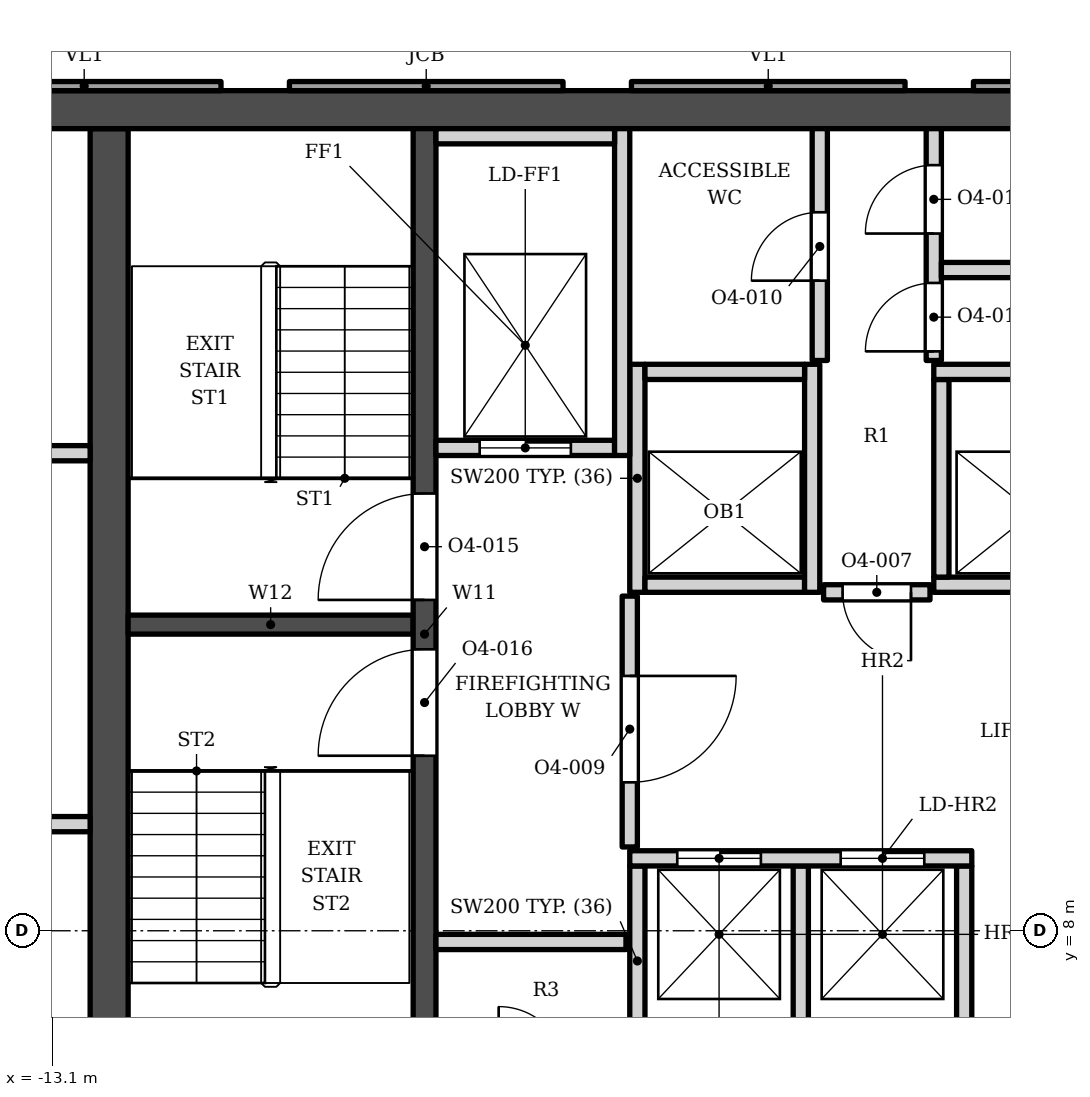
"""IFC4 building model, lengths in metres.
Left out: names, types, materials, properties, quantities, classifications, styles, units other than length and angle.
Written with IfcOpenShell. Run it as: python <this file> out.ifc"""

import sys

from ifc_helpers import new_model, si_unit, direction, frame, frame_2d, origin, place, context, subcontext, project, spatial, polyline, rectangle, outline, extrude, element, fill, save


model = new_model("IFC4")
c1 = context("Model", 3, precision=1e-05, world=origin(), true_north=direction((0.0, 1.0)))
c2 = subcontext(c1, "Body", "Model", "MODEL_VIEW")
j1 = project(units=[si_unit("LENGTHUNIT", "METRE"), si_unit("PLANEANGLEUNIT", "RADIAN")], contexts=[c1])
p1 = place(None, origin())
s1 = spatial("IfcSite", under=j1, at=p1, CompositionType="ELEMENT")
p2 = place(p1, origin())
s2 = spatial("IfcBuilding", under=s1, at=p2, CompositionType="ELEMENT")
p3 = place(p2, frame((0.0, 0.0, 179.7)))
s3 = spatial("IfcBuildingStorey", under=s2, at=p3, CompositionType="ELEMENT", Elevation=179.7)
p4 = place(p3, frame((-15.1, 18.802, 0.0), z_axis=(0.0, 0.0, 1.0), x_axis=(1.0, 0.0, 0.0)))
e1 = element("IfcWall", 1, at=p4, inside=s3, PredefinedType="SHEAR", context=c2, shape_type="SweptSolid", body=[
    extrude(rectangle(XDim=30.2, YDim=0.5, at=frame_2d((15.1, 0.0))), origin(), (0.0, 0.0, 1.0), 3.9),
])
p5 = place(p3, frame((-12.35, 5.253, 0.0), z_axis=(0.0, 0.0, 1.0), x_axis=(0.0, 1.0, 0.0)))
e2 = element("IfcWall", 2, at=p5, inside=s3, PredefinedType="SHEAR", context=c2, shape_type="SweptSolid", body=[
    extrude(rectangle(XDim=13.3, YDim=0.5, at=frame_2d((6.65, 0.0))), origin(), (0.0, 0.0, 1.0), 3.9),
])
p6 = place(p3, frame((-8.2, 5.253, 0.0), z_axis=(0.0, 0.0, 1.0), x_axis=(0.0, 1.0, 0.0)))
e3 = element("IfcWall", 3, at=p6, inside=s3, PredefinedType="SHEAR", context=c2, shape_type="SweptSolid", body=[
    extrude(rectangle(XDim=13.3, YDim=0.3, at=frame_2d((6.65, 0.0))), origin(), (0.0, 0.0, 1.0), 3.9),
])
p7 = place(p6, frame((7.1, 0.0, 0.0)))
e4 = element("IfcOpeningElement", 4, at=p7, cuts=e3, PredefinedType="OPENING", context=c2, shape_type="SweptSolid", body=[
    extrude(rectangle(XDim=1.4, YDim=2.1, at=frame_2d((0.7, 1.05))), frame((0.0, 0.16, 0.0), z_axis=(0.0, -1.0, 0.0), x_axis=(1.0, 0.0, 0.0)), (0.0, 0.0, 1.0), 0.32),
])
p8 = place(p6, frame((5.05, 0.0, 0.0)))
e5 = element("IfcOpeningElement", 5, at=p8, cuts=e3, PredefinedType="OPENING", context=c2, shape_type="SweptSolid", body=[
    extrude(rectangle(XDim=1.4, YDim=2.1, at=frame_2d((0.7, 1.05))), frame((0.0, 0.16, 0.0), z_axis=(0.0, -1.0, 0.0), x_axis=(1.0, 0.0, 0.0)), (0.0, 0.0, 1.0), 0.32),
])
p9 = place(p3, frame((-12.1, 12.028, 0.0), z_axis=(0.0, 0.0, 1.0), x_axis=(1.0, 0.0, 0.0)))
e6 = element("IfcWall", 6, at=p9, inside=s3, PredefinedType="SHEAR", context=c2, shape_type="SweptSolid", body=[
    extrude(rectangle(XDim=3.75, YDim=0.25, at=frame_2d((1.875, 0.0))), origin(), (0.0, 0.0, 1.0), 3.9),
])
p10 = place(p3, origin())
e7 = element("IfcWall", 7, at=p10, inside=s3, PredefinedType="SOLIDWALL", context=c2, shape_type="SweptSolid", body=[
    extrude(outline(polyline([(-0.978, 19.173), (-0.978, 19.052), (2.622, 19.052), (2.622, 19.173), (-0.978, 19.173)])), origin(), (0.0, 0.0, 1.0), 3.0),
])
p11 = place(p3, origin())
e8 = element("IfcWall", 8, at=p11, inside=s3, PredefinedType="ELEMENTEDWALL", context=c2, shape_type="SweptSolid", body=[
    extrude(outline(polyline([(-5.478, 19.173), (-5.478, 19.052), (-1.878, 19.052), (-1.878, 19.173), (-5.478, 19.173)])), origin(), (0.0, 0.0, 1.0), 3.0),
])
p12 = place(p3, origin())
e9 = element("IfcWall", 9, at=p12, inside=s3, PredefinedType="SOLIDWALL", context=c2, shape_type="SweptSolid", body=[
    extrude(outline(polyline([(-9.978, 19.173), (-9.978, 19.052), (-6.378, 19.052), (-6.378, 19.173), (-9.978, 19.173)])), origin(), (0.0, 0.0, 1.0), 3.0),
])
p13 = place(p3, origin())
e10 = element("IfcWall", 10, at=p13, inside=s3, PredefinedType="ELEMENTEDWALL", context=c2, shape_type="SweptSolid", body=[
    extrude(outline(polyline([(-14.478, 19.173), (-14.478, 19.052), (-10.878, 19.052), (-10.878, 19.173), (-14.478, 19.173)])), origin(), (0.0, 0.0, 1.0), 3.0),
])
for number, where, z_axis, x_axis in (
    (11, (-5.4, 6.353, 0.0), (0.0, 0.0, 1.0), (0.0, 1.0, 0.0)),
    (12, (-3.25, 6.353, 0.0), (0.0, 0.0, 1.0), (0.0, 1.0, 0.0)),
    (13, (-1.1, 6.353, 0.0), (0.0, 0.0, 1.0), (0.0, 1.0, 0.0)),
    (14, (-8.05, 7.853, 0.0), (0.0, 0.0, 1.0), (1.0, 0.0, 0.0)),
):
    element("IfcWall", number, at=place(p3, frame(where, z_axis=z_axis, x_axis=x_axis)), inside=s3, PredefinedType="SOLIDWALL", context=c2, shape_type="SweptSolid", body=[
        extrude(rectangle(XDim=2.5, YDim=0.2, at=frame_2d((1.25, 0.0))), origin(), (0.0, 0.0, 1.0), 3.73),
    ])
p14 = place(p3, frame((-5.5, 8.953, 0.0), z_axis=(0.0, 0.0, 1.0), x_axis=(1.0, 0.0, 0.0)))
e15 = element("IfcWall", 15, at=p14, inside=s3, PredefinedType="SOLIDWALL", context=c2, shape_type="SweptSolid", body=[
    extrude(rectangle(XDim=4.5, YDim=0.2, at=frame_2d((2.25, 0.0))), origin(), (0.0, 0.0, 1.0), 3.73),
])
p15 = place(p14, frame((0.625, 0.0, 0.0)))
e16 = element("IfcOpeningElement", 16, at=p15, cuts=e15, PredefinedType="OPENING", context=c2, shape_type="SweptSolid", body=[
    extrude(rectangle(XDim=1.1, YDim=2.1, at=frame_2d((0.55, 1.05))), frame((0.0, 0.11, 0.0), z_axis=(0.0, -1.0, 0.0), x_axis=(1.0, 0.0, 0.0)), (0.0, 0.0, 1.0), 0.22),
])
p16 = place(p14, frame((2.775, 0.0, 0.0)))
e17 = element("IfcOpeningElement", 17, at=p16, cuts=e15, PredefinedType="OPENING", context=c2, shape_type="SweptSolid", body=[
    extrude(rectangle(XDim=1.1, YDim=2.1, at=frame_2d((0.55, 1.05))), frame((0.0, 0.11, 0.0), z_axis=(0.0, -1.0, 0.0), x_axis=(1.0, 0.0, 0.0)), (0.0, 0.0, 1.0), 0.22),
])
p17 = place(p3, frame((-5.5, 9.103, 0.0), z_axis=(0.0, 0.0, 1.0), x_axis=(0.0, 1.0, 0.0)))
e18 = element("IfcWall", 18, at=p17, inside=s3, PredefinedType="SOLIDWALL", context=c2, shape_type="SweptSolid", body=[
    extrude(rectangle(XDim=3.3, YDim=0.2, at=frame_2d((1.65, 0.0))), origin(), (0.0, 0.0, 1.0), 3.73),
])
p18 = place(p17, frame((0.85, 0.0, 0.0)))
e19 = element("IfcOpeningElement", 19, at=p18, cuts=e18, PredefinedType="OPENING", context=c2, shape_type="SweptSolid", body=[
    extrude(rectangle(XDim=1.4, YDim=2.1, at=frame_2d((0.7, 1.05))), frame((0.0, 0.11, 0.0), z_axis=(0.0, -1.0, 0.0), x_axis=(1.0, 0.0, 0.0)), (0.0, 0.0, 1.0), 0.22),
])
p19 = place(p3, frame((-15.1, 9.403, 0.0), z_axis=(0.0, 0.0, 1.0), x_axis=(1.0, 0.0, 0.0)))
e20 = element("IfcWall", 20, at=p19, inside=s3, PredefinedType="PARTITIONING", context=c2, shape_type="SweptSolid", body=[
    extrude(rectangle(XDim=2.5, YDim=0.2, at=frame_2d((1.25, 0.0))), origin(), (0.0, 0.0, 1.0), 3.73),
])
p20 = place(p3, frame((-2.95, 12.453, 0.0), z_axis=(0.0, 0.0, 1.0), x_axis=(1.0, 0.0, 0.0)))
e21 = element("IfcWall", 21, at=p20, inside=s3, PredefinedType="SOLIDWALL", context=c2, shape_type="SweptSolid", body=[
    extrude(rectangle(XDim=1.4, YDim=0.2, at=frame_2d((0.7, 0.0))), origin(), (0.0, 0.0, 1.0), 3.73),
])
p21 = place(p20, frame((0.25, 0.0, 0.0)))
e22 = element("IfcOpeningElement", 22, at=p21, cuts=e21, PredefinedType="OPENING", context=c2, shape_type="SweptSolid", body=[
    extrude(rectangle(XDim=0.9, YDim=2.1, at=frame_2d((0.45, 1.05))), frame((0.0, 0.11, 0.0), z_axis=(0.0, -1.0, 0.0), x_axis=(1.0, 0.0, 0.0)), (0.0, 0.0, 1.0), 0.22),
])
p22 = place(p3, frame((-5.4, 12.453, 0.0), z_axis=(0.0, 0.0, 1.0), x_axis=(0.0, 1.0, 0.0)))
e23 = element("IfcWall", 23, at=p22, inside=s3, PredefinedType="SOLIDWALL", context=c2, shape_type="SweptSolid", body=[
    extrude(rectangle(XDim=3.0, YDim=0.2, at=frame_2d((1.5, 0.0))), origin(), (0.0, 0.0, 1.0), 3.73),
])
p23 = place(p3, frame((-5.3, 12.552, 0.0), z_axis=(0.0, 0.0, 1.0), x_axis=(1.0, 0.0, 0.0)))
e24 = element("IfcWall", 24, at=p23, inside=s3, PredefinedType="SOLIDWALL", context=c2, shape_type="SweptSolid", body=[
    extrude(rectangle(XDim=2.1, YDim=0.2, at=frame_2d((1.05, 0.0))), origin(), (0.0, 0.0, 1.0), 3.73),
])
p24 = place(p3, frame((-3.1, 12.453, 0.0), z_axis=(0.0, 0.0, 1.0), x_axis=(0.0, 1.0, 0.0)))
e25 = element("IfcWall", 25, at=p24, inside=s3, PredefinedType="SOLIDWALL", context=c2, shape_type="SweptSolid", body=[
    extrude(rectangle(XDim=3.0, YDim=0.2, at=frame_2d((1.5, 0.0))), origin(), (0.0, 0.0, 1.0), 3.73),
])
p25 = place(p3, frame((-1.5, 12.552, 0.0), z_axis=(0.0, 0.0, 1.0), x_axis=(1.0, 0.0, 0.0)))
e26 = element("IfcWall", 26, at=p25, inside=s3, PredefinedType="SOLIDWALL", context=c2, shape_type="SweptSolid", body=[
    extrude(rectangle(XDim=7.0, YDim=0.2, at=frame_2d((3.5, 0.0))), origin(), (0.0, 0.0, 1.0), 3.73),
])
p26 = place(p25, frame((3.075, 0.0, 0.0)))
e27 = element("IfcOpeningElement", 27, at=p26, cuts=e26, PredefinedType="OPENING", context=c2, shape_type="SweptSolid", body=[
    extrude(rectangle(XDim=1.1, YDim=2.1, at=frame_2d((0.55, 1.05))), frame((0.0, 0.11, 0.0), z_axis=(0.0, -1.0, 0.0), x_axis=(1.0, 0.0, 0.0)), (0.0, 0.0, 1.0), 0.22),
])
p27 = place(p25, frame((5.275, 0.0, 0.0)))
e28 = element("IfcOpeningElement", 28, at=p27, cuts=e26, PredefinedType="OPENING", context=c2, shape_type="SweptSolid", body=[
    extrude(rectangle(XDim=1.1, YDim=2.1, at=frame_2d((0.55, 1.05))), frame((0.0, 0.11, 0.0), z_axis=(0.0, -1.0, 0.0), x_axis=(1.0, 0.0, 0.0)), (0.0, 0.0, 1.0), 0.22),
])
p28 = place(p3, frame((-1.4, 12.653, 0.0), z_axis=(0.0, 0.0, 1.0), x_axis=(0.0, 1.0, 0.0)))
e29 = element("IfcWall", 29, at=p28, inside=s3, PredefinedType="SOLIDWALL", context=c2, shape_type="SweptSolid", body=[
    extrude(rectangle(XDim=2.6, YDim=0.2, at=frame_2d((1.3, 0.0))), origin(), (0.0, 0.0, 1.0), 3.73),
])
p29 = place(p3, frame((-15.1, 14.283, 0.0), z_axis=(0.0, 0.0, 1.0), x_axis=(1.0, 0.0, 0.0)))
e30 = element("IfcWall", 30, at=p29, inside=s3, PredefinedType="PARTITIONING", context=c2, shape_type="SweptSolid", body=[
    extrude(rectangle(XDim=2.5, YDim=0.2, at=frame_2d((1.25, 0.0))), origin(), (0.0, 0.0, 1.0), 3.73),
])
p30 = place(p3, frame((-8.05, 14.353, 0.0), z_axis=(0.0, 0.0, 1.0), x_axis=(1.0, 0.0, 0.0)))
e31 = element("IfcWall", 31, at=p30, inside=s3, PredefinedType="SOLIDWALL", context=c2, shape_type="SweptSolid", body=[
    extrude(rectangle(XDim=2.35, YDim=0.2, at=frame_2d((1.175, 0.0))), origin(), (0.0, 0.0, 1.0), 3.73),
])
p31 = place(p30, frame((0.575, 0.0, 0.0)))
e32 = element("IfcOpeningElement", 32, at=p31, cuts=e31, PredefinedType="OPENING", context=c2, shape_type="SweptSolid", body=[
    extrude(rectangle(XDim=1.2, YDim=2.1, at=frame_2d((0.6, 1.05))), frame((0.0, 0.11, 0.0), z_axis=(0.0, -1.0, 0.0), x_axis=(1.0, 0.0, 0.0)), (0.0, 0.0, 1.0), 0.22),
])
p32 = place(p3, frame((-5.6, 14.253, 0.0), z_axis=(0.0, 0.0, 1.0), x_axis=(0.0, 1.0, 0.0)))
e33 = element("IfcWall", 33, at=p32, inside=s3, PredefinedType="SOLIDWALL", context=c2, shape_type="SweptSolid", body=[
    extrude(rectangle(XDim=4.3, YDim=0.2, at=frame_2d((2.15, 0.0))), origin(), (0.0, 0.0, 1.0), 3.73),
])
p33 = place(p3, frame((-5.3, 15.353, 0.0), z_axis=(0.0, 0.0, 1.0), x_axis=(1.0, 0.0, 0.0)))
e34 = element("IfcWall", 34, at=p33, inside=s3, PredefinedType="SOLIDWALL", context=c2, shape_type="SweptSolid", body=[
    extrude(rectangle(XDim=2.1, YDim=0.2, at=frame_2d((1.05, 0.0))), origin(), (0.0, 0.0, 1.0), 3.73),
])
p34 = place(p3, frame((-1.5, 15.353, 0.0), z_axis=(0.0, 0.0, 1.0), x_axis=(1.0, 0.0, 0.0)))
e35 = element("IfcWall", 35, at=p34, inside=s3, PredefinedType="SOLIDWALL", context=c2, shape_type="SweptSolid", body=[
    extrude(rectangle(XDim=7.2, YDim=0.2, at=frame_2d((3.6, 0.0))), origin(), (0.0, 0.0, 1.0), 3.73),
])
p35 = place(p3, frame((-3.0, 15.503, 0.0), z_axis=(0.0, 0.0, 1.0), x_axis=(0.0, 1.0, 0.0)))
e36 = element("IfcWall", 36, at=p35, inside=s3, PredefinedType="SOLIDWALL", context=c2, shape_type="SweptSolid", body=[
    extrude(rectangle(XDim=3.05, YDim=0.2, at=frame_2d((1.525, 0.0))), origin(), (0.0, 0.0, 1.0), 3.73),
])
p36 = place(p35, frame((1.05, 0.0, 0.0)))
e37 = element("IfcOpeningElement", 37, at=p36, cuts=e36, PredefinedType="OPENING", context=c2, shape_type="SweptSolid", body=[
    extrude(rectangle(XDim=0.9, YDim=2.1, at=frame_2d((0.45, 1.05))), frame((0.0, 0.11, 0.0), z_axis=(0.0, -1.0, 0.0), x_axis=(1.0, 0.0, 0.0)), (0.0, 0.0, 1.0), 0.22),
])
p37 = place(p3, frame((-1.5, 15.503, 0.0), z_axis=(0.0, 0.0, 1.0), x_axis=(0.0, 1.0, 0.0)))
e38 = element("IfcWall", 38, at=p37, inside=s3, PredefinedType="SOLIDWALL", context=c2, shape_type="SweptSolid", body=[
    extrude(rectangle(XDim=3.05, YDim=0.2, at=frame_2d((1.525, 0.0))), origin(), (0.0, 0.0, 1.0), 3.73),
])
p38 = place(p37, frame((0.12, 0.0, 0.0)))
e39 = element("IfcOpeningElement", 39, at=p38, cuts=e38, PredefinedType="OPENING", context=c2, shape_type="SweptSolid", body=[
    extrude(rectangle(XDim=0.9, YDim=2.1, at=frame_2d((0.45, 1.05))), frame((0.0, 0.11, 0.0), z_axis=(0.0, -1.0, 0.0), x_axis=(1.0, 0.0, 0.0)), (0.0, 0.0, 1.0), 0.22),
])
p39 = place(p37, frame((1.67, 0.0, 0.0)))
e40 = element("IfcOpeningElement", 40, at=p39, cuts=e38, PredefinedType="OPENING", context=c2, shape_type="SweptSolid", body=[
    extrude(rectangle(XDim=0.9, YDim=2.1, at=frame_2d((0.45, 1.05))), frame((0.0, 0.11, 0.0), z_axis=(0.0, -1.0, 0.0), x_axis=(1.0, 0.0, 0.0)), (0.0, 0.0, 1.0), 0.22),
])
p40 = place(p3, frame((-1.4, 16.693, 0.0), z_axis=(0.0, 0.0, 1.0), x_axis=(1.0, 0.0, 0.0)))
e41 = element("IfcWall", 41, at=p40, inside=s3, PredefinedType="SOLIDWALL", context=c2, shape_type="SweptSolid", body=[
    extrude(rectangle(XDim=6.85, YDim=0.2, at=frame_2d((3.425, 0.0))), origin(), (0.0, 0.0, 1.0), 3.73),
])
p41 = place(p3, frame((-8.05, 18.453, 0.0), z_axis=(0.0, 0.0, 1.0), x_axis=(1.0, 0.0, 0.0)))
e42 = element("IfcWall", 42, at=p41, inside=s3, PredefinedType="SOLIDWALL", context=c2, shape_type="SweptSolid", body=[
    extrude(rectangle(XDim=2.35, YDim=0.2, at=frame_2d((1.175, 0.0))), origin(), (0.0, 0.0, 1.0), 3.73),
])
p42 = place(p15, origin())
e43 = element("IfcDoor", 43, at=p42, inside=s3, OperationType="DOUBLE_DOOR_SLIDING", PredefinedType="DOOR", context=c2, shape_type="SweptSolid", body=[
    extrude(rectangle(XDim=1.1, YDim=2.1, at=frame_2d((0.55, 1.05))), frame((0.0, 0.025, 0.0), z_axis=(0.0, -1.0, 0.0), x_axis=(1.0, 0.0, 0.0)), (0.0, 0.0, 1.0), 0.05),
])
fill(e16, e43)
p43 = place(p16, origin())
e44 = element("IfcDoor", 44, at=p43, inside=s3, OperationType="DOUBLE_DOOR_SLIDING", PredefinedType="DOOR", context=c2, shape_type="SweptSolid", body=[
    extrude(rectangle(XDim=1.1, YDim=2.1, at=frame_2d((0.55, 1.05))), frame((0.0, 0.025, 0.0), z_axis=(0.0, -1.0, 0.0), x_axis=(1.0, 0.0, 0.0)), (0.0, 0.0, 1.0), 0.05),
])
fill(e17, e44)
p44 = place(p31, origin())
e45 = element("IfcDoor", 45, at=p44, inside=s3, OperationType="DOUBLE_DOOR_SLIDING", PredefinedType="DOOR", context=c2, shape_type="SweptSolid", body=[
    extrude(rectangle(XDim=1.2, YDim=2.1, at=frame_2d((0.6, 1.05))), frame((0.0, 0.025, 0.0), z_axis=(0.0, -1.0, 0.0), x_axis=(1.0, 0.0, 0.0)), (0.0, 0.0, 1.0), 0.05),
])
fill(e32, e45)
p45 = place(p7, origin())
e46 = element("IfcDoor", 46, at=p45, inside=s3, OperationType="SINGLE_SWING_LEFT", PredefinedType="DOOR", context=c2, shape_type="SweptSolid", body=[
    extrude(rectangle(XDim=1.4, YDim=2.1, at=frame_2d((0.7, 1.05))), frame((0.0, 0.025, 0.0), z_axis=(0.0, -1.0, 0.0), x_axis=(1.0, 0.0, 0.0)), (0.0, 0.0, 1.0), 0.05),
])
fill(e4, e46)
p46 = place(p8, origin())
e47 = element("IfcDoor", 47, at=p46, inside=s3, OperationType="SINGLE_SWING_LEFT", PredefinedType="DOOR", context=c2, shape_type="SweptSolid", body=[
    extrude(rectangle(XDim=1.4, YDim=2.1, at=frame_2d((0.7, 1.05))), frame((0.0, 0.025, 0.0), z_axis=(0.0, -1.0, 0.0), x_axis=(1.0, 0.0, 0.0)), (0.0, 0.0, 1.0), 0.05),
])
fill(e5, e47)
p47 = place(p21, origin())
e48 = element("IfcDoor", 48, at=p47, inside=s3, OperationType="SINGLE_SWING_RIGHT", PredefinedType="DOOR", context=c2, shape_type="SweptSolid", body=[
    extrude(rectangle(XDim=0.9, YDim=2.1, at=frame_2d((0.45, 1.05))), frame((0.0, 0.025, 0.0), z_axis=(0.0, -1.0, 0.0), x_axis=(1.0, 0.0, 0.0)), (0.0, 0.0, 1.0), 0.05),
])
fill(e22, e48)
p48 = place(p18, origin())
e49 = element("IfcDoor", 49, at=p48, inside=s3, OperationType="SINGLE_SWING_RIGHT", PredefinedType="DOOR", context=c2, shape_type="SweptSolid", body=[
    extrude(rectangle(XDim=1.4, YDim=2.1, at=frame_2d((0.7, 1.05))), frame((0.0, 0.025, 0.0), z_axis=(0.0, -1.0, 0.0), x_axis=(1.0, 0.0, 0.0)), (0.0, 0.0, 1.0), 0.05),
])
fill(e19, e49)
p49 = place(p36, origin())
e50 = element("IfcDoor", 50, at=p49, inside=s3, OperationType="SINGLE_SWING_LEFT", PredefinedType="DOOR", context=c2, shape_type="SweptSolid", body=[
    extrude(rectangle(XDim=0.9, YDim=2.1, at=frame_2d((0.45, 1.05))), frame((0.0, 0.025, 0.0), z_axis=(0.0, -1.0, 0.0), x_axis=(1.0, 0.0, 0.0)), (0.0, 0.0, 1.0), 0.05),
])
fill(e37, e50)
p50 = place(p38, origin())
e51 = element("IfcDoor", 51, at=p50, inside=s3, OperationType="SINGLE_SWING_LEFT", PredefinedType="DOOR", context=c2, shape_type="SweptSolid", body=[
    extrude(rectangle(XDim=0.9, YDim=2.1, at=frame_2d((0.45, 1.05))), frame((0.0, 0.025, 0.0), z_axis=(0.0, -1.0, 0.0), x_axis=(1.0, 0.0, 0.0)), (0.0, 0.0, 1.0), 0.05),
])
fill(e39, e51)
p51 = place(p39, origin())
e52 = element("IfcDoor", 52, at=p51, inside=s3, OperationType="SINGLE_SWING_LEFT", PredefinedType="DOOR", context=c2, shape_type="SweptSolid", body=[
    extrude(rectangle(XDim=0.9, YDim=2.1, at=frame_2d((0.45, 1.05))), frame((0.0, 0.025, 0.0), z_axis=(0.0, -1.0, 0.0), x_axis=(1.0, 0.0, 0.0)), (0.0, 0.0, 1.0), 0.05),
])
fill(e40, e52)
save(model, sys.argv[1])
